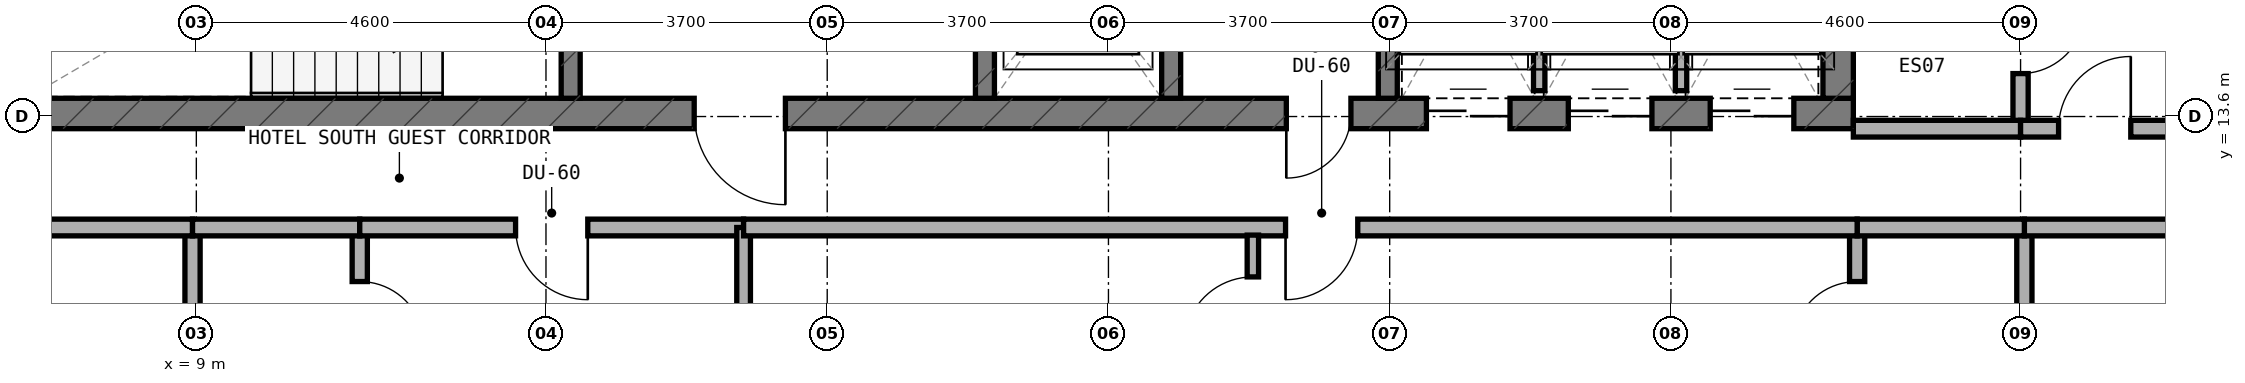
"""IFC4 building model, lengths in metres.
Left out: names, types, materials, properties, quantities, classifications, styles, units other than length and angle.
Written with IfcOpenShell. Run it as: python <this file> out.ifc"""

import sys

from ifc_helpers import new_model, si_unit, direction, frame, frame_2d, origin, place, context, subcontext, project, spatial, rectangle, extrude, element, fill, save


model = new_model("IFC4")
c1 = context("Model", 3, precision=1e-05, world=origin(), true_north=direction((0.0, 1.0)))
c2 = subcontext(c1, "Body", "Model", "MODEL_VIEW")
j1 = project(units=[si_unit("LENGTHUNIT", "METRE"), si_unit("PLANEANGLEUNIT", "RADIAN")], contexts=[c1])
p1 = place(None, origin())
s1 = spatial("IfcSite", under=j1, at=p1, CompositionType="ELEMENT")
p2 = place(p1, origin())
s2 = spatial("IfcBuilding", under=s1, at=p2, CompositionType="ELEMENT")
p3 = place(p2, frame((0.0, 0.0, 257.6)))
s3 = spatial("IfcBuildingStorey", under=s2, at=p3, CompositionType="ELEMENT", Elevation=257.6)
p4 = place(p3, frame((6.4, 13.64, 0.0), z_axis=(0.0, 0.0, 1.0), x_axis=(1.0, 0.0, 0.0)))
e1 = element("IfcWall", 1, at=p4, inside=s3, PredefinedType="SHEAR", context=c2, shape_type="SweptSolid", body=[
    extrude(rectangle(XDim=24.4, YDim=0.4, at=frame_2d((12.2, 0.0))), origin(), (0.0, 0.0, 1.0), 3.6),
])
p5 = place(p4, frame((9.15, 0.0, 0.0)))
e2 = element("IfcOpeningElement", 2, at=p5, cuts=e1, PredefinedType="OPENING", context=c2, shape_type="SweptSolid", body=[
    extrude(rectangle(XDim=1.2, YDim=2.15, at=frame_2d((0.6, 1.075))), frame((0.0, 0.21, 0.0), z_axis=(0.0, -1.0, 0.0), x_axis=(1.0, 0.0, 0.0)), (0.0, 0.0, 1.0), 0.42),
])
p6 = place(p4, frame((16.94, 0.0, 0.0)))
e3 = element("IfcOpeningElement", 3, at=p6, cuts=e1, PredefinedType="OPENING", context=c2, shape_type="SweptSolid", body=[
    extrude(rectangle(XDim=0.85, YDim=2.1, at=frame_2d((0.425, 1.05))), frame((0.0, 0.21, 0.0), z_axis=(0.0, -1.0, 0.0), x_axis=(1.0, 0.0, 0.0)), (0.0, 0.0, 1.0), 0.42),
])
p7 = place(p4, frame((18.783, 0.0, 0.0)))
e4 = element("IfcOpeningElement", 4, at=p7, cuts=e1, PredefinedType="OPENING", context=c2, shape_type="SweptSolid", body=[
    extrude(rectangle(XDim=1.1, YDim=2.15, at=frame_2d((0.55, 1.075))), frame((0.0, 0.21, 0.0), z_axis=(0.0, -1.0, 0.0), x_axis=(1.0, 0.0, 0.0)), (0.0, 0.0, 1.0), 0.42),
])
p8 = place(p4, frame((20.65, 0.0, 0.0)))
e5 = element("IfcOpeningElement", 5, at=p8, cuts=e1, PredefinedType="OPENING", context=c2, shape_type="SweptSolid", body=[
    extrude(rectangle(XDim=1.1, YDim=2.15, at=frame_2d((0.55, 1.075))), frame((0.0, 0.21, 0.0), z_axis=(0.0, -1.0, 0.0), x_axis=(1.0, 0.0, 0.0)), (0.0, 0.0, 1.0), 0.42),
])
p9 = place(p4, frame((22.517, 0.0, 0.0)))
e6 = element("IfcOpeningElement", 6, at=p9, cuts=e1, PredefinedType="OPENING", context=c2, shape_type="SweptSolid", body=[
    extrude(rectangle(XDim=1.1, YDim=2.15, at=frame_2d((0.55, 1.075))), frame((0.0, 0.21, 0.0), z_axis=(0.0, -1.0, 0.0), x_axis=(1.0, 0.0, 0.0)), (0.0, 0.0, 1.0), 0.42),
])
p10 = place(p3, frame((30.6, 13.84, 0.0), z_axis=(0.0, 0.0, 1.0), x_axis=(0.0, 1.0, 0.0)))
e7 = element("IfcWall", 7, at=p10, inside=s3, PredefinedType="SHEAR", context=c2, shape_type="SweptSolid", body=[
    extrude(rectangle(XDim=3.16, YDim=0.4, at=frame_2d((1.58, 0.0))), origin(), (0.0, 0.0, 1.0), 3.6),
])
p11 = place(p3, frame((13.925, 13.84, 0.0), z_axis=(0.0, 0.0, 1.0), x_axis=(0.0, 1.0, 0.0)))
e8 = element("IfcWall", 8, at=p11, inside=s3, PredefinedType="STANDARD", context=c2, shape_type="SweptSolid", body=[
    extrude(rectangle(XDim=3.16, YDim=0.25, at=frame_2d((1.58, 0.0))), origin(), (0.0, 0.0, 1.0), 3.32),
])
p12 = place(p11, frame((0.98, 0.0, 0.0)))
e9 = element("IfcOpeningElement", 9, at=p12, cuts=e8, PredefinedType="OPENING", context=c2, shape_type="SweptSolid", body=[
    extrude(rectangle(XDim=1.1, YDim=2.15, at=frame_2d((0.55, 1.075))), frame((0.0, 0.135, 0.0), z_axis=(0.0, -1.0, 0.0), x_axis=(1.0, 0.0, 0.0)), (0.0, 0.0, 1.0), 0.27),
])
p13 = place(p3, frame((19.375, 13.84, 0.0), z_axis=(0.0, 0.0, 1.0), x_axis=(0.0, 1.0, 0.0)))
e10 = element("IfcWall", 10, at=p13, inside=s3, PredefinedType="STANDARD", context=c2, shape_type="SweptSolid", body=[
    extrude(rectangle(XDim=3.16, YDim=0.25, at=frame_2d((1.58, 0.0))), origin(), (0.0, 0.0, 1.0), 3.32),
])
p14 = place(p13, frame((0.98, 0.0, 0.0)))
e11 = element("IfcOpeningElement", 11, at=p14, cuts=e10, PredefinedType="OPENING", context=c2, shape_type="SweptSolid", body=[
    extrude(rectangle(XDim=1.1, YDim=2.15, at=frame_2d((0.55, 1.075))), frame((0.0, 0.135, 0.0), z_axis=(0.0, -1.0, 0.0), x_axis=(1.0, 0.0, 0.0)), (0.0, 0.0, 1.0), 0.27),
])
for number, where, z_axis, x_axis in (
    (12, (21.825, 13.84, 0.0), (0.0, 0.0, 1.0), (0.0, 1.0, 0.0)),
    (13, (24.675, 13.84, 0.0), (0.0, 0.0, 1.0), (0.0, 1.0, 0.0)),
):
    element("IfcWall", number, at=place(p3, frame(where, z_axis=z_axis, x_axis=x_axis)), inside=s3, PredefinedType="STANDARD", context=c2, shape_type="SweptSolid", body=[
        extrude(rectangle(XDim=3.16, YDim=0.25, at=frame_2d((1.58, 0.0))), origin(), (0.0, 0.0, 1.0), 3.32),
    ])
p15 = place(p3, frame((26.667, 13.94, 0.0), z_axis=(0.0, 0.0, 1.0), x_axis=(0.0, 1.0, 0.0)))
e14 = element("IfcWall", 14, at=p15, inside=s3, PredefinedType="PARTITIONING", context=c2, shape_type="SweptSolid", body=[
    extrude(rectangle(XDim=2.96, YDim=0.15, at=frame_2d((1.48, 0.0))), origin(), (0.0, 0.0, 1.0), 3.32),
])
p16 = place(p3, frame((28.533, 13.94, 0.0), z_axis=(0.0, 0.0, 1.0), x_axis=(0.0, 1.0, 0.0)))
e15 = element("IfcWall", 15, at=p16, inside=s3, PredefinedType="PARTITIONING", context=c2, shape_type="SweptSolid", body=[
    extrude(rectangle(XDim=2.96, YDim=0.15, at=frame_2d((1.48, 0.0))), origin(), (0.0, 0.0, 1.0), 2.795),
])
p17 = place(p3, frame((11.15, 9.968, 0.0), z_axis=(0.0, 0.0, 1.0), x_axis=(0.0, 1.0, 0.0)))
e16 = element("IfcWall", 16, at=p17, inside=s3, PredefinedType="PLUMBINGWALL", context=c2, shape_type="SweptSolid", body=[
    extrude(rectangle(XDim=2.072, YDim=0.2, at=frame_2d((1.036, 0.0))), origin(), (0.0, 0.0, 1.0), 2.895),
])
p18 = place(p17, frame((0.611, 0.0, 0.0)))
e17 = element("IfcOpeningElement", 17, at=p18, cuts=e16, PredefinedType="OPENING", context=c2, shape_type="SweptSolid", body=[
    extrude(rectangle(XDim=0.85, YDim=2.1, at=frame_2d((0.425, 1.05))), frame((0.0, 0.11, 0.0), z_axis=(0.0, -1.0, 0.0), x_axis=(1.0, 0.0, 0.0)), (0.0, 0.0, 1.0), 0.22),
])
p19 = place(p3, frame((8.95, 9.968, 0.0), z_axis=(0.0, 0.0, 1.0), x_axis=(0.0, 1.0, 0.0)))
e18 = element("IfcWall", 18, at=p19, inside=s3, PredefinedType="PLUMBINGWALL", context=c2, shape_type="SweptSolid", body=[
    extrude(rectangle(XDim=2.072, YDim=0.2, at=frame_2d((1.036, 0.0))), origin(), (0.0, 0.0, 1.0), 2.895),
])
p20 = place(p3, frame((3.96, 12.14, 0.0), z_axis=(0.0, 0.0, 1.0), x_axis=(1.0, 0.0, 0.0)))
e19 = element("IfcWall", 19, at=p20, inside=s3, PredefinedType="SOLIDWALL", context=c2, shape_type="SweptSolid", body=[
    extrude(rectangle(XDim=4.99, YDim=0.22, at=frame_2d((2.495, 0.0))), origin(), (0.0, 0.0, 1.0), 2.795),
])
p21 = place(p3, frame((8.95, 12.14, 0.0), z_axis=(0.0, 0.0, 1.0), x_axis=(1.0, 0.0, 0.0)))
e20 = element("IfcWall", 20, at=p21, inside=s3, PredefinedType="SOLIDWALL", context=c2, shape_type="SweptSolid", body=[
    extrude(rectangle(XDim=2.2, YDim=0.22, at=frame_2d((1.1, 0.0))), origin(), (0.0, 0.0, 1.0), 3.32),
])
p22 = place(p3, frame((11.15, 12.14, 0.0), z_axis=(0.0, 0.0, 1.0), x_axis=(1.0, 0.0, 0.0)))
e21 = element("IfcWall", 21, at=p22, inside=s3, PredefinedType="SOLIDWALL", context=c2, shape_type="SweptSolid", body=[
    extrude(rectangle(XDim=5.05, YDim=0.22, at=frame_2d((2.525, 0.0))), origin(), (0.0, 0.0, 1.0), 2.795),
])
p23 = place(p22, frame((2.05, 0.0, 0.0)))
e22 = element("IfcOpeningElement", 22, at=p23, cuts=e21, PredefinedType="OPENING", context=c2, shape_type="SweptSolid", body=[
    extrude(rectangle(XDim=0.95, YDim=2.1, at=frame_2d((0.475, 1.05))), frame((0.0, 0.12, 0.0), z_axis=(0.0, -1.0, 0.0), x_axis=(1.0, 0.0, 0.0)), (0.0, 0.0, 1.0), 0.24),
])
p24 = place(p3, frame((16.2, 7.26, 0.0), z_axis=(0.0, 0.0, 1.0), x_axis=(0.0, 1.0, 0.0)))
e23 = element("IfcWall", 23, at=p24, inside=s3, PredefinedType="SOLIDWALL", context=c2, shape_type="SweptSolid", body=[
    extrude(rectangle(XDim=4.88, YDim=0.18, at=frame_2d((2.44, 0.0))), origin(), (0.0, 0.0, 1.0), 2.795),
])
p25 = place(p3, frame((30.85, 9.968, 0.0), z_axis=(0.0, 0.0, 1.0), x_axis=(0.0, 1.0, 0.0)))
e24 = element("IfcWall", 24, at=p25, inside=s3, PredefinedType="PLUMBINGWALL", context=c2, shape_type="SweptSolid", body=[
    extrude(rectangle(XDim=2.072, YDim=0.2, at=frame_2d((1.036, 0.0))), origin(), (0.0, 0.0, 1.0), 2.895),
])
p26 = place(p25, frame((0.611, 0.0, 0.0)))
e25 = element("IfcOpeningElement", 25, at=p26, cuts=e24, PredefinedType="OPENING", context=c2, shape_type="SweptSolid", body=[
    extrude(rectangle(XDim=0.85, YDim=2.1, at=frame_2d((0.425, 1.05))), frame((0.0, 0.11, 0.0), z_axis=(0.0, -1.0, 0.0), x_axis=(1.0, 0.0, 0.0)), (0.0, 0.0, 1.0), 0.22),
])
p27 = place(p3, frame((33.05, 9.968, 0.0), z_axis=(0.0, 0.0, 1.0), x_axis=(0.0, 1.0, 0.0)))
e26 = element("IfcWall", 26, at=p27, inside=s3, PredefinedType="PLUMBINGWALL", context=c2, shape_type="SweptSolid", body=[
    extrude(rectangle(XDim=2.072, YDim=0.2, at=frame_2d((1.036, 0.0))), origin(), (0.0, 0.0, 1.0), 2.895),
])
p28 = place(p3, frame((33.05, 12.14, 0.0), z_axis=(0.0, 0.0, 1.0), x_axis=(1.0, 0.0, 0.0)))
e27 = element("IfcWall", 27, at=p28, inside=s3, PredefinedType="SOLIDWALL", context=c2, shape_type="SweptSolid", body=[
    extrude(rectangle(XDim=4.99, YDim=0.22, at=frame_2d((2.495, 0.0))), origin(), (0.0, 0.0, 1.0), 2.795),
])
p29 = place(p3, frame((30.85, 12.14, 0.0), z_axis=(0.0, 0.0, 1.0), x_axis=(1.0, 0.0, 0.0)))
e28 = element("IfcWall", 28, at=p29, inside=s3, PredefinedType="SOLIDWALL", context=c2, shape_type="SweptSolid", body=[
    extrude(rectangle(XDim=2.2, YDim=0.22, at=frame_2d((1.1, 0.0))), origin(), (0.0, 0.0, 1.0), 3.32),
])
p30 = place(p3, frame((16.2, 12.14, 0.0), z_axis=(0.0, 0.0, 1.0), x_axis=(1.0, 0.0, 0.0)))
e29 = element("IfcWall", 29, at=p30, inside=s3, PredefinedType="SOLIDWALL", context=c2, shape_type="SweptSolid", body=[
    extrude(rectangle(XDim=14.65, YDim=0.22, at=frame_2d((7.325, 0.0))), origin(), (0.0, 0.0, 1.0), 2.795),
])
p31 = place(p30, frame((7.13, 0.0, 0.0)))
e30 = element("IfcOpeningElement", 30, at=p31, cuts=e29, PredefinedType="OPENING", context=c2, shape_type="SweptSolid", body=[
    extrude(rectangle(XDim=0.95, YDim=2.1, at=frame_2d((0.475, 1.05))), frame((0.0, 0.12, 0.0), z_axis=(0.0, -1.0, 0.0), x_axis=(1.0, 0.0, 0.0)), (0.0, 0.0, 1.0), 0.24),
])
p32 = place(p3, frame((22.9, 7.36, 0.0), z_axis=(0.0, 0.0, 1.0), x_axis=(0.0, 1.0, 0.0)))
e31 = element("IfcWall", 31, at=p32, inside=s3, PredefinedType="PARTITIONING", context=c2, shape_type="SweptSolid", body=[
    extrude(rectangle(XDim=4.68, YDim=0.15, at=frame_2d((2.34, 0.0))), origin(), (0.0, 0.0, 1.0), 2.895),
])
p33 = place(p32, frame((3.23, 0.0, 0.0)))
e32 = element("IfcOpeningElement", 32, at=p33, cuts=e31, PredefinedType="OPENING", context=c2, shape_type="SweptSolid", body=[
    extrude(rectangle(XDim=0.9, YDim=2.1, at=frame_2d((0.45, 1.05))), frame((0.0, 0.085, 0.0), z_axis=(0.0, -1.0, 0.0), x_axis=(1.0, 0.0, 0.0)), (0.0, 0.0, 1.0), 0.17),
])
p34 = place(p3, frame((33.0, 13.54, 0.0), z_axis=(0.0, 0.0, 1.0), x_axis=(0.0, 1.0, 0.0)))
e33 = element("IfcWall", 33, at=p34, inside=s3, PredefinedType="PLUMBINGWALL", context=c2, shape_type="SweptSolid", body=[
    extrude(rectangle(XDim=2.1, YDim=0.2, at=frame_2d((1.05, 0.0))), origin(), (0.0, 0.0, 1.0), 3.32),
])
p35 = place(p34, frame((0.625, 0.0, 0.0)))
e34 = element("IfcOpeningElement", 34, at=p35, cuts=e33, PredefinedType="OPENING", context=c2, shape_type="SweptSolid", body=[
    extrude(rectangle(XDim=0.85, YDim=2.1, at=frame_2d((0.425, 1.05))), frame((0.0, 0.11, 0.0), z_axis=(0.0, -1.0, 0.0), x_axis=(1.0, 0.0, 0.0)), (0.0, 0.0, 1.0), 0.22),
])
p36 = place(p3, frame((30.8, 13.44, 0.0), z_axis=(0.0, 0.0, 1.0), x_axis=(1.0, 0.0, 0.0)))
e35 = element("IfcWall", 35, at=p36, inside=s3, PredefinedType="SOLIDWALL", context=c2, shape_type="SweptSolid", body=[
    extrude(rectangle(XDim=2.2, YDim=0.22, at=frame_2d((1.1, 0.0))), origin(), (0.0, 0.0, 1.0), 3.32),
])
p37 = place(p3, frame((33.0, 13.44, 0.0), z_axis=(0.0, 0.0, 1.0), x_axis=(1.0, 0.0, 0.0)))
e36 = element("IfcWall", 36, at=p37, inside=s3, PredefinedType="SOLIDWALL", context=c2, shape_type="SweptSolid", body=[
    extrude(rectangle(XDim=5.2, YDim=0.22, at=frame_2d((2.6, 0.0))), origin(), (0.0, 0.0, 1.0), 2.795),
])
p38 = place(p37, frame((0.5, 0.0, 0.0)))
e37 = element("IfcOpeningElement", 37, at=p38, cuts=e36, PredefinedType="OPENING", context=c2, shape_type="SweptSolid", body=[
    extrude(rectangle(XDim=0.95, YDim=2.1, at=frame_2d((0.475, 1.05))), frame((0.0, 0.12, 0.0), z_axis=(0.0, -1.0, 0.0), x_axis=(1.0, 0.0, 0.0)), (0.0, 0.0, 1.0), 0.24),
])
p39 = place(p5, frame((1.2, 0.0, 0.0), z_axis=(0.0, 0.0, 1.0), x_axis=(-1.0, 0.0, 0.0)))
e38 = element("IfcDoor", 38, at=p39, inside=s3, OperationType="SINGLE_SWING_LEFT", PredefinedType="DOOR", context=c2, shape_type="SweptSolid", body=[
    extrude(rectangle(XDim=1.2, YDim=2.15, at=frame_2d((0.6, 1.075))), frame((0.0, 0.025, 0.0), z_axis=(0.0, -1.0, 0.0), x_axis=(1.0, 0.0, 0.0)), (0.0, 0.0, 1.0), 0.05),
])
fill(e2, e38)
p40 = place(p6, frame((0.85, 0.0, 0.0), z_axis=(0.0, 0.0, 1.0), x_axis=(-1.0, 0.0, 0.0)))
e39 = element("IfcDoor", 39, at=p40, inside=s3, OperationType="SINGLE_SWING_RIGHT", PredefinedType="DOOR", context=c2, shape_type="SweptSolid", body=[
    extrude(rectangle(XDim=0.85, YDim=2.1, at=frame_2d((0.425, 1.05))), frame((0.0, 0.025, 0.0), z_axis=(0.0, -1.0, 0.0), x_axis=(1.0, 0.0, 0.0)), (0.0, 0.0, 1.0), 0.05),
])
fill(e3, e39)
p41 = place(p7, frame((1.1, 0.0, 0.0), z_axis=(0.0, 0.0, 1.0), x_axis=(-1.0, 0.0, 0.0)))
e40 = element("IfcDoor", 40, at=p41, inside=s3, OperationType="DOUBLE_DOOR_SLIDING", PredefinedType="DOOR", context=c2, shape_type="SweptSolid", body=[
    extrude(rectangle(XDim=1.1, YDim=2.15, at=frame_2d((0.55, 1.075))), frame((0.0, 0.025, 0.0), z_axis=(0.0, -1.0, 0.0), x_axis=(1.0, 0.0, 0.0)), (0.0, 0.0, 1.0), 0.05),
])
fill(e4, e40)
p42 = place(p8, frame((1.1, 0.0, 0.0), z_axis=(0.0, 0.0, 1.0), x_axis=(-1.0, 0.0, 0.0)))
e41 = element("IfcDoor", 41, at=p42, inside=s3, OperationType="DOUBLE_DOOR_SLIDING", PredefinedType="DOOR", context=c2, shape_type="SweptSolid", body=[
    extrude(rectangle(XDim=1.1, YDim=2.15, at=frame_2d((0.55, 1.075))), frame((0.0, 0.025, 0.0), z_axis=(0.0, -1.0, 0.0), x_axis=(1.0, 0.0, 0.0)), (0.0, 0.0, 1.0), 0.05),
])
fill(e5, e41)
p43 = place(p9, frame((1.1, 0.0, 0.0), z_axis=(0.0, 0.0, 1.0), x_axis=(-1.0, 0.0, 0.0)))
e42 = element("IfcDoor", 42, at=p43, inside=s3, OperationType="DOUBLE_DOOR_SLIDING", PredefinedType="DOOR", context=c2, shape_type="SweptSolid", body=[
    extrude(rectangle(XDim=1.1, YDim=2.15, at=frame_2d((0.55, 1.075))), frame((0.0, 0.025, 0.0), z_axis=(0.0, -1.0, 0.0), x_axis=(1.0, 0.0, 0.0)), (0.0, 0.0, 1.0), 0.05),
])
fill(e6, e42)
p44 = place(p18, frame((0.85, 0.0, 0.0), z_axis=(0.0, 0.0, 1.0), x_axis=(-1.0, 0.0, 0.0)))
e43 = element("IfcDoor", 43, at=p44, inside=s3, OperationType="SINGLE_SWING_RIGHT", PredefinedType="DOOR", context=c2, shape_type="SweptSolid", body=[
    extrude(rectangle(XDim=0.85, YDim=2.1, at=frame_2d((0.425, 1.05))), frame((0.0, 0.025, 0.0), z_axis=(0.0, -1.0, 0.0), x_axis=(1.0, 0.0, 0.0)), (0.0, 0.0, 1.0), 0.05),
])
fill(e17, e43)
p45 = place(p23, frame((0.95, 0.0, 0.0), z_axis=(0.0, 0.0, 1.0), x_axis=(-1.0, 0.0, 0.0)))
e44 = element("IfcDoor", 44, at=p45, inside=s3, OperationType="SINGLE_SWING_LEFT", PredefinedType="DOOR", context=c2, shape_type="SweptSolid", body=[
    extrude(rectangle(XDim=0.95, YDim=2.1, at=frame_2d((0.475, 1.05))), frame((0.0, 0.025, 0.0), z_axis=(0.0, -1.0, 0.0), x_axis=(1.0, 0.0, 0.0)), (0.0, 0.0, 1.0), 0.05),
])
fill(e22, e44)
p46 = place(p26, origin())
e45 = element("IfcDoor", 45, at=p46, inside=s3, OperationType="SINGLE_SWING_LEFT", PredefinedType="DOOR", context=c2, shape_type="SweptSolid", body=[
    extrude(rectangle(XDim=0.85, YDim=2.1, at=frame_2d((0.425, 1.05))), frame((0.0, 0.025, 0.0), z_axis=(0.0, -1.0, 0.0), x_axis=(1.0, 0.0, 0.0)), (0.0, 0.0, 1.0), 0.05),
])
fill(e25, e45)
p47 = place(p31, frame((0.95, 0.0, 0.0), z_axis=(0.0, 0.0, 1.0), x_axis=(-1.0, 0.0, 0.0)))
e46 = element("IfcDoor", 46, at=p47, inside=s3, OperationType="SINGLE_SWING_RIGHT", PredefinedType="DOOR", context=c2, shape_type="SweptSolid", body=[
    extrude(rectangle(XDim=0.95, YDim=2.1, at=frame_2d((0.475, 1.05))), frame((0.0, 0.025, 0.0), z_axis=(0.0, -1.0, 0.0), x_axis=(1.0, 0.0, 0.0)), (0.0, 0.0, 1.0), 0.05),
])
fill(e30, e46)
p48 = place(p33, origin())
e47 = element("IfcDoor", 47, at=p48, inside=s3, OperationType="SINGLE_SWING_LEFT", PredefinedType="DOOR", context=c2, shape_type="SweptSolid", body=[
    extrude(rectangle(XDim=0.9, YDim=2.1, at=frame_2d((0.45, 1.05))), frame((0.0, 0.025, 0.0), z_axis=(0.0, -1.0, 0.0), x_axis=(1.0, 0.0, 0.0)), (0.0, 0.0, 1.0), 0.05),
])
fill(e32, e47)
p49 = place(p35, frame((0.85, 0.0, 0.0), z_axis=(0.0, 0.0, 1.0), x_axis=(-1.0, 0.0, 0.0)))
e48 = element("IfcDoor", 48, at=p49, inside=s3, OperationType="SINGLE_SWING_LEFT", PredefinedType="DOOR", context=c2, shape_type="SweptSolid", body=[
    extrude(rectangle(XDim=0.85, YDim=2.1, at=frame_2d((0.425, 1.05))), frame((0.0, 0.025, 0.0), z_axis=(0.0, -1.0, 0.0), x_axis=(1.0, 0.0, 0.0)), (0.0, 0.0, 1.0), 0.05),
])
fill(e34, e48)
p50 = place(p38, origin())
e49 = element("IfcDoor", 49, at=p50, inside=s3, OperationType="SINGLE_SWING_RIGHT", PredefinedType="DOOR", context=c2, shape_type="SweptSolid", body=[
    extrude(rectangle(XDim=0.95, YDim=2.1, at=frame_2d((0.475, 1.05))), frame((0.0, 0.025, 0.0), z_axis=(0.0, -1.0, 0.0), x_axis=(1.0, 0.0, 0.0)), (0.0, 0.0, 1.0), 0.05),
])
fill(e37, e49)
save(model, sys.argv[1])
